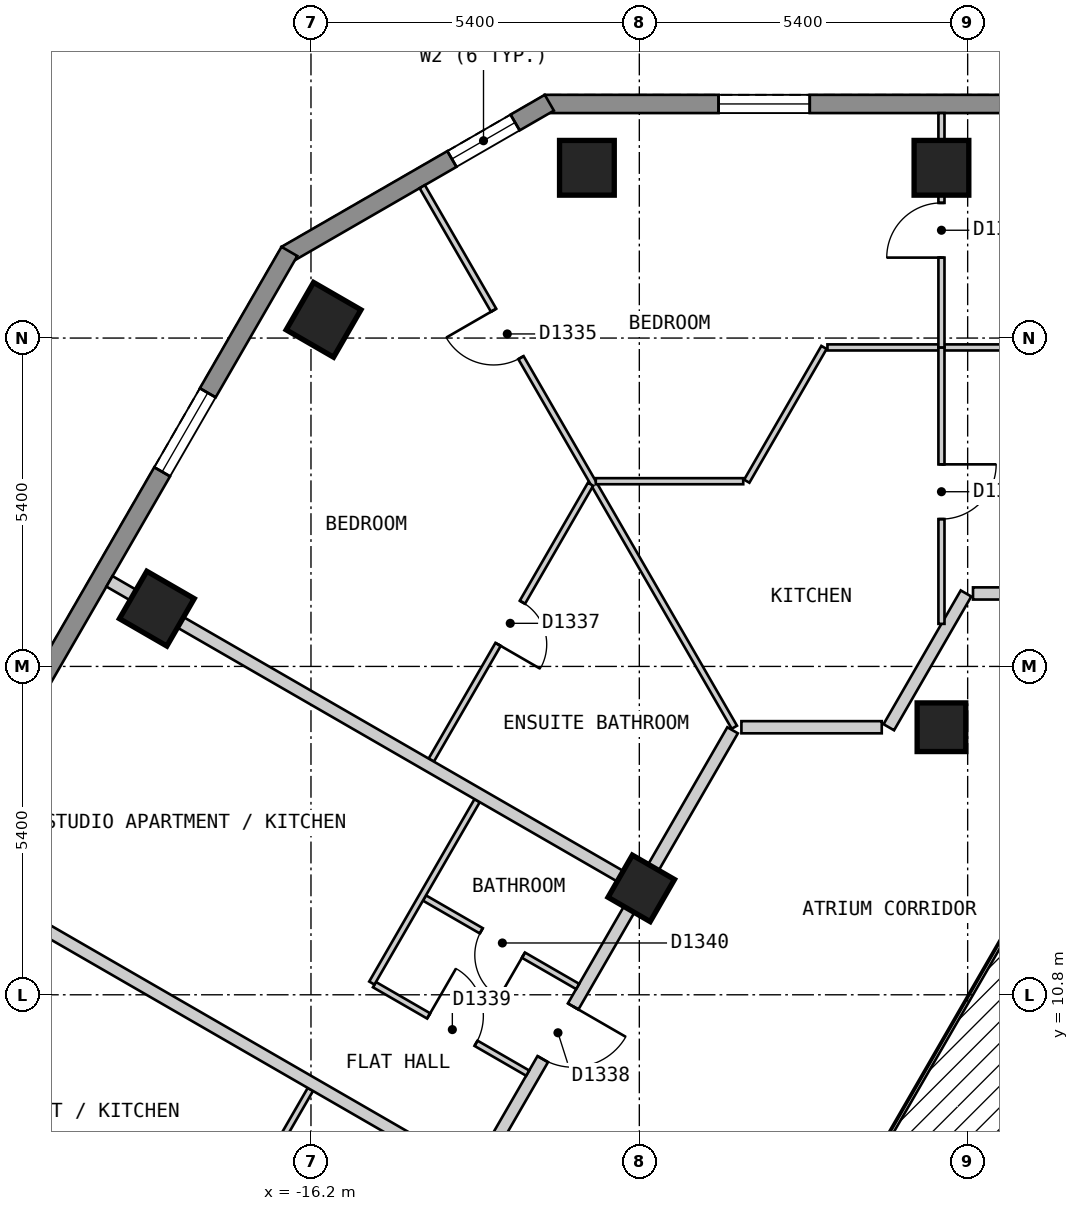
"""IFC4 building model, lengths in metres.
Left out: names, types, materials, properties, quantities, classifications, styles, units other than length and angle.
Written with IfcOpenShell. Run it as: python <this file> out.ifc"""

import sys

from ifc_helpers import new_model, si_unit, direction, frame, frame_2d, origin, origin_2d, place, context, subcontext, project, spatial, polyline, rectangle, outline, extrude, element, fill, save


model = new_model("IFC4")
c1 = context("Model", 3, precision=1e-05, world=origin(), true_north=direction((0.0, 1.0)))
c2 = subcontext(c1, "Body", "Model", "MODEL_VIEW")
j1 = project(units=[si_unit("LENGTHUNIT", "METRE"), si_unit("PLANEANGLEUNIT", "RADIAN")], contexts=[c1])
p1 = place(None, origin())
s1 = spatial("IfcSite", under=j1, at=p1, CompositionType="ELEMENT")
p2 = place(p1, origin())
s2 = spatial("IfcBuilding", under=s1, at=p2, CompositionType="ELEMENT")
p3 = place(p2, frame((0.0, 0.0, 135.6)))
s3 = spatial("IfcBuildingStorey", under=s2, at=p3, CompositionType="ELEMENT", Elevation=135.6)
for number, where, z_axis, x_axis in (
    (1, (-5.831, 24.4, 0.0), (0.0, 0.0, 1.0), (-1.0, 0.0, 0.0)),
    (2, (-11.662, 24.4, 0.0), (0.0, 0.0, 1.0), (-1.0, 0.0, 0.0)),
    (3, (-15.993, 21.9, 0.0), (0.0, 0.0, 1.0), (-0.5, -0.866, 0.0)),
    (4, (-18.735, 17.15, 0.0), (0.0, 0.0, 1.0), (-0.5, -0.866, 0.0)),
):
    element("IfcColumn", number, at=place(p3, frame(where, z_axis=z_axis, x_axis=x_axis)), inside=s3, PredefinedType="COLUMN", context=c2, shape_type="SweptSolid", body=[
        extrude(rectangle(XDim=0.9, YDim=0.9, at=origin_2d()), origin(), (0.0, 0.0, 1.0), 3.0),
    ])
for number, where, z_axis, x_axis in (
    (5, (-5.831, 15.2, 0.0), (0.0, 0.0, 1.0), (-1.0, 0.0, 0.0)),
    (6, (-10.768, 12.55, 0.0), (0.0, 0.0, 1.0), (-0.5, -0.866, 0.0)),
):
    element("IfcColumn", number, at=place(p3, frame(where, z_axis=z_axis, x_axis=x_axis)), inside=s3, PredefinedType="COLUMN", context=c2, shape_type="SweptSolid", body=[
        extrude(rectangle(XDim=0.8, YDim=0.8, at=origin_2d()), origin(), (0.0, 0.0, 1.0), 3.0),
    ])
p4 = place(p3, frame((12.355, 25.45, 0.0), z_axis=(0.0, 0.0, 1.0), x_axis=(-1.0, 0.0, 0.0)))
e7 = element("IfcWall", 7, at=p4, inside=s3, PredefinedType="SOLIDWALL", context=c2, shape_type="SweptSolid", body=[
    extrude(outline(polyline([(0.0, -0.15), (24.71, -0.15), (24.63, 0.15), (0.08, 0.15), (0.0, -0.15)])), origin(), (0.0, 0.0, 1.0), 2.7),
])
p5 = place(p4, frame((2.858, 0.0, 0.15)))
e8 = element("IfcOpeningElement", 8, at=p5, cuts=e7, PredefinedType="OPENING", context=c2, shape_type="SweptSolid", body=[
    extrude(rectangle(XDim=1.5, YDim=2.1, at=frame_2d((0.75, 1.05))), frame((0.0, 0.16, 0.0), z_axis=(0.0, -1.0, 0.0), x_axis=(1.0, 0.0, 0.0)), (0.0, 0.0, 1.0), 0.32),
])
p6 = place(p4, frame((8.689, 0.0, 0.15)))
e9 = element("IfcOpeningElement", 9, at=p6, cuts=e7, PredefinedType="OPENING", context=c2, shape_type="SweptSolid", body=[
    extrude(rectangle(XDim=1.5, YDim=2.1, at=frame_2d((0.75, 1.05))), frame((0.0, 0.16, 0.0), z_axis=(0.0, -1.0, 0.0), x_axis=(1.0, 0.0, 0.0)), (0.0, 0.0, 1.0), 0.32),
])
p7 = place(p4, frame((14.521, 0.0, 0.15)))
e10 = element("IfcOpeningElement", 10, at=p7, cuts=e7, PredefinedType="OPENING", context=c2, shape_type="SweptSolid", body=[
    extrude(rectangle(XDim=1.5, YDim=2.1, at=frame_2d((0.75, 1.05))), frame((0.0, 0.16, 0.0), z_axis=(0.0, -1.0, 0.0), x_axis=(1.0, 0.0, 0.0)), (0.0, 0.0, 1.0), 0.32),
])
p8 = place(p4, frame((20.352, 0.0, 0.15)))
e11 = element("IfcOpeningElement", 11, at=p8, cuts=e7, PredefinedType="OPENING", context=c2, shape_type="SweptSolid", body=[
    extrude(rectangle(XDim=1.5, YDim=2.1, at=frame_2d((0.75, 1.05))), frame((0.0, 0.16, 0.0), z_axis=(0.0, -1.0, 0.0), x_axis=(1.0, 0.0, 0.0)), (0.0, 0.0, 1.0), 0.32),
])
p9 = place(p3, frame((-12.28, 25.47, 0.0), z_axis=(0.0, 0.0, 1.0), x_axis=(-0.866022959057, -0.500004234368, 0.0)))
e12 = element("IfcWall", 12, at=p9, inside=s3, PredefinedType="SOLIDWALL", context=c2, shape_type="SweptSolid", body=[
    extrude(outline(polyline([(0.0, -0.15), (5.0, -0.15), (4.92, 0.15), (0.08, 0.15), (0.0, -0.15)])), origin(), (0.0, 0.0, 1.0), 2.7),
])
p10 = place(p9, frame((0.65, 0.0, 0.15)))
e13 = element("IfcOpeningElement", 13, at=p10, cuts=e12, PredefinedType="OPENING", context=c2, shape_type="SweptSolid", body=[
    extrude(rectangle(XDim=1.2, YDim=2.1, at=frame_2d((0.6, 1.05))), frame((0.0, 0.16, 0.0), z_axis=(0.0, -1.0, 0.0), x_axis=(1.0, 0.0, 0.0)), (0.0, 0.0, 1.0), 0.32),
])
p11 = place(p3, frame((-16.555, 23.025, 0.0), z_axis=(0.0, 0.0, 1.0), x_axis=(-0.500020536353, -0.866013546791, 0.0)))
e14 = element("IfcWall", 14, at=p11, inside=s3, PredefinedType="SOLIDWALL", context=c2, shape_type="SweptSolid", body=[
    extrude(outline(polyline([(0.0, -0.15), (23.325, -0.15), (23.245, 0.15), (0.08, 0.15), (0.0, -0.15)])), origin(), (0.0, 0.0, 1.0), 2.7),
])
p12 = place(p11, frame((2.685, 0.0, 0.15)))
e15 = element("IfcOpeningElement", 15, at=p12, cuts=e14, PredefinedType="OPENING", context=c2, shape_type="SweptSolid", body=[
    extrude(rectangle(XDim=1.5, YDim=2.1, at=frame_2d((0.75, 1.05))), frame((0.0, 0.16, 0.0), z_axis=(0.0, -1.0, 0.0), x_axis=(1.0, 0.0, 0.0)), (0.0, 0.0, 1.0), 0.32),
])
p13 = place(p11, frame((8.171, 0.0, 0.15)))
e16 = element("IfcOpeningElement", 16, at=p13, cuts=e14, PredefinedType="OPENING", context=c2, shape_type="SweptSolid", body=[
    extrude(rectangle(XDim=1.5, YDim=2.1, at=frame_2d((0.75, 1.05))), frame((0.0, 0.16, 0.0), z_axis=(0.0, -1.0, 0.0), x_axis=(1.0, 0.0, 0.0)), (0.0, 0.0, 1.0), 0.32),
])
p14 = place(p11, frame((13.655, 0.0, 0.15)))
e17 = element("IfcOpeningElement", 17, at=p14, cuts=e14, PredefinedType="OPENING", context=c2, shape_type="SweptSolid", body=[
    extrude(rectangle(XDim=1.5, YDim=2.1, at=frame_2d((0.75, 1.05))), frame((0.0, 0.16, 0.0), z_axis=(0.0, -1.0, 0.0), x_axis=(1.0, 0.0, 0.0)), (0.0, 0.0, 1.0), 0.32),
])
p15 = place(p11, frame((19.14, 0.0, 0.15)))
e18 = element("IfcOpeningElement", 18, at=p15, cuts=e14, PredefinedType="OPENING", context=c2, shape_type="SweptSolid", body=[
    extrude(rectangle(XDim=1.5, YDim=2.1, at=frame_2d((0.75, 1.05))), frame((0.0, 0.16, 0.0), z_axis=(0.0, -1.0, 0.0), x_axis=(1.0, 0.0, 0.0)), (0.0, 0.0, 1.0), 0.32),
])
p16 = place(p3, frame((-9.121, 15.2, 0.0), z_axis=(0.0, 0.0, 1.0), x_axis=(1.0, 0.0, 0.0)))
e19 = element("IfcWall", 19, at=p16, inside=s3, PredefinedType="PARTITIONING", context=c2, shape_type="SweptSolid", body=[
    extrude(rectangle(XDim=2.308, YDim=0.2, at=frame_2d((1.154, 0.0))), origin(), (0.0, 0.0, 1.0), 2.7),
])
p17 = place(p3, frame((-5.312, 17.4, 0.0), z_axis=(0.0, 0.0, 1.0), x_axis=(1.0, 0.0, 0.0)))
e20 = element("IfcWall", 20, at=p17, inside=s3, PredefinedType="PARTITIONING", context=c2, shape_type="SweptSolid", body=[
    extrude(rectangle(XDim=10.739, YDim=0.2, at=frame_2d((5.37, 0.0))), origin(), (0.0, 0.0, 1.0), 2.7),
])
p18 = place(p17, frame((1.896, 0.0, 0.0)))
e21 = element("IfcOpeningElement", 21, at=p18, cuts=e20, PredefinedType="OPENING", context=c2, shape_type="SweptSolid", body=[
    extrude(rectangle(XDim=1.0, YDim=2.1, at=frame_2d((0.5, 1.05))), frame((0.0, 0.11, 0.0), z_axis=(0.0, -1.0, 0.0), x_axis=(1.0, 0.0, 0.0)), (0.0, 0.0, 1.0), 0.22),
])
p19 = place(p3, frame((-6.697, 15.2, 0.0), z_axis=(0.0, 0.0, 1.0), x_axis=(0.499963722229, 0.866046347752, 0.0)))
e22 = element("IfcWall", 22, at=p19, inside=s3, PredefinedType="PARTITIONING", context=c2, shape_type="SweptSolid", body=[
    extrude(rectangle(XDim=2.54, YDim=0.2, at=frame_2d((1.27, 0.0))), origin(), (0.0, 0.0, 1.0), 2.7),
])
p20 = place(p3, frame((-17.724, 0.5, 0.0), z_axis=(0.0, 0.0, 1.0), x_axis=(0.499994801602, 0.86602840506, 0.0)))
e23 = element("IfcWall", 23, at=p20, inside=s3, PredefinedType="PARTITIONING", context=c2, shape_type="SweptSolid", body=[
    extrude(rectangle(XDim=16.916, YDim=0.2, at=frame_2d((8.458, 0.0))), origin(), (0.0, 0.0, 1.0), 2.7),
])
p21 = place(p20, frame((10.672, 0.0, 0.0)))
e24 = element("IfcOpeningElement", 24, at=p21, cuts=e23, PredefinedType="OPENING", context=c2, shape_type="SweptSolid", body=[
    extrude(rectangle(XDim=1.0, YDim=2.1, at=frame_2d((0.5, 1.05))), frame((0.0, 0.11, 0.0), z_axis=(0.0, -1.0, 0.0), x_axis=(1.0, 0.0, 0.0)), (0.0, 0.0, 1.0), 0.22),
])
p22 = place(p20, frame((5.187, 0.0, 0.0)))
e25 = element("IfcOpeningElement", 25, at=p22, cuts=e23, PredefinedType="OPENING", context=c2, shape_type="SweptSolid", body=[
    extrude(rectangle(XDim=1.0, YDim=2.1, at=frame_2d((0.5, 1.05))), frame((0.0, 0.11, 0.0), z_axis=(0.0, -1.0, 0.0), x_axis=(1.0, 0.0, 0.0)), (0.0, 0.0, 1.0), 0.22),
])
p23 = place(p20, frame((0.566, 0.0, 0.0)))
e26 = element("IfcOpeningElement", 26, at=p23, cuts=e23, PredefinedType="OPENING", context=c2, shape_type="SweptSolid", body=[
    extrude(rectangle(XDim=1.0, YDim=2.1, at=frame_2d((0.5, 1.05))), frame((0.0, 0.11, 0.0), z_axis=(0.0, -1.0, 0.0), x_axis=(1.0, 0.0, 0.0)), (0.0, 0.0, 1.0), 0.22),
])
p24 = place(p3, frame((-14.37, 24.09, 0.0), z_axis=(0.0, 0.0, 1.0), x_axis=(0.50002438799, -0.866011322914, 0.0)))
e27 = element("IfcWall", 27, at=p24, inside=s3, PredefinedType="PARTITIONING", context=c2, shape_type="SweptSolid", body=[
    extrude(rectangle(XDim=10.266, YDim=0.1, at=frame_2d((5.133, 0.0))), origin(), (0.0, 0.0, 1.0), 2.7),
])
p25 = place(p24, frame((2.347, 0.0, 0.0)))
e28 = element("IfcOpeningElement", 28, at=p25, cuts=e27, PredefinedType="OPENING", context=c2, shape_type="SweptSolid", body=[
    extrude(rectangle(XDim=0.9, YDim=2.1, at=frame_2d((0.45, 1.05))), frame((0.0, 0.06, 0.0), z_axis=(0.0, -1.0, 0.0), x_axis=(1.0, 0.0, 0.0)), (0.0, 0.0, 1.0), 0.12),
])
p26 = place(p3, frame((-14.334, 12.392, 0.0), z_axis=(0.0, 0.0, 1.0), x_axis=(0.866003949776, -0.500037157592, 0.0)))
e29 = element("IfcWall", 29, at=p26, inside=s3, PredefinedType="PARTITIONING", context=c2, shape_type="SweptSolid", body=[
    extrude(rectangle(XDim=2.91, YDim=0.1, at=frame_2d((1.455, 0.0))), origin(), (0.0, 0.0, 1.0), 2.7),
])
p27 = place(p26, frame((1.08, 0.0, 0.0)))
e30 = element("IfcOpeningElement", 30, at=p27, cuts=e29, PredefinedType="OPENING", context=c2, shape_type="SweptSolid", body=[
    extrude(rectangle(XDim=0.8, YDim=2.1, at=frame_2d((0.4, 1.05))), frame((0.0, 0.06, 0.0), z_axis=(0.0, -1.0, 0.0), x_axis=(1.0, 0.0, 0.0)), (0.0, 0.0, 1.0), 0.12),
])
p28 = place(p3, frame((-15.156, 10.967, 0.0), z_axis=(0.0, 0.0, 1.0), x_axis=(0.866003949776, -0.500037157592, 0.0)))
e31 = element("IfcWall", 31, at=p28, inside=s3, PredefinedType="PARTITIONING", context=c2, shape_type="SweptSolid", body=[
    extrude(rectangle(XDim=2.91, YDim=0.1, at=frame_2d((1.455, 0.0))), origin(), (0.0, 0.0, 1.0), 2.7),
])
p29 = place(p28, frame((1.029, 0.0, 0.0)))
e32 = element("IfcOpeningElement", 32, at=p29, cuts=e31, PredefinedType="OPENING", context=c2, shape_type="SweptSolid", body=[
    extrude(rectangle(XDim=0.9, YDim=2.1, at=frame_2d((0.45, 1.05))), frame((0.0, 0.06, 0.0), z_axis=(0.0, -1.0, 0.0), x_axis=(1.0, 0.0, 0.0)), (0.0, 0.0, 1.0), 0.12),
])
p30 = place(p3, frame((-11.516, 19.246, 0.0), z_axis=(0.0, 0.0, 1.0), x_axis=(1.0, 0.0, 0.0)))
e33 = element("IfcWall", 33, at=p30, inside=s3, PredefinedType="PARTITIONING", context=c2, shape_type="SweptSolid", body=[
    extrude(rectangle(XDim=2.425, YDim=0.1, at=frame_2d((1.212, 0.0))), origin(), (0.0, 0.0, 1.0), 2.7),
])
p31 = place(p3, frame((-7.706, 21.446, 0.0), z_axis=(0.0, 0.0, 1.0), x_axis=(1.0, 0.0, 0.0)))
e34 = element("IfcWall", 34, at=p31, inside=s3, PredefinedType="PARTITIONING", context=c2, shape_type="SweptSolid", body=[
    extrude(rectangle(XDim=15.469, YDim=0.1, at=frame_2d((7.734, 0.0))), origin(), (0.0, 0.0, 1.0), 2.7),
])
p32 = place(p31, frame((4.35, 0.0, 0.0)))
e35 = element("IfcOpeningElement", 35, at=p32, cuts=e34, PredefinedType="OPENING", context=c2, shape_type="SweptSolid", body=[
    extrude(rectangle(XDim=0.9, YDim=2.1, at=frame_2d((0.45, 1.05))), frame((0.0, 0.06, 0.0), z_axis=(0.0, -1.0, 0.0), x_axis=(1.0, 0.0, 0.0)), (0.0, 0.0, 1.0), 0.12),
])
p33 = place(p3, frame((-9.033, 19.246, 0.0), z_axis=(0.0, 0.0, 1.0), x_axis=(0.499963722229, 0.866046347752, 0.0)))
e36 = element("IfcWall", 36, at=p33, inside=s3, PredefinedType="PARTITIONING", context=c2, shape_type="SweptSolid", body=[
    extrude(rectangle(XDim=2.54, YDim=0.1, at=frame_2d((1.27, 0.0))), origin(), (0.0, 0.0, 1.0), 2.7),
])
p34 = place(p3, frame((-17.942, 6.243, 0.0), z_axis=(0.0, 0.0, 1.0), x_axis=(0.49997462182, 0.866040055388, 0.0)))
e37 = element("IfcWall", 37, at=p34, inside=s3, PredefinedType="PARTITIONING", context=c2, shape_type="SweptSolid", body=[
    extrude(rectangle(XDim=3.464, YDim=0.1, at=frame_2d((1.732, 0.0))), origin(), (0.0, 0.0, 1.0), 2.7),
])
p35 = place(p3, frame((-15.199, 10.993, 0.0), z_axis=(0.0, 0.0, 1.0), x_axis=(0.499885210257, 0.866091667531, 0.0)))
e38 = element("IfcWall", 38, at=p35, inside=s3, PredefinedType="PARTITIONING", context=c2, shape_type="SweptSolid", body=[
    extrude(rectangle(XDim=3.463, YDim=0.1, at=frame_2d((1.731, 0.0))), origin(), (0.0, 0.0, 1.0), 2.7),
])
p36 = place(p3, frame((-14.222, 14.659, 0.0), z_axis=(0.0, 0.0, 1.0), x_axis=(0.500053212623, 0.865994679283, 0.0)))
e39 = element("IfcWall", 39, at=p36, inside=s3, PredefinedType="PARTITIONING", context=c2, shape_type="SweptSolid", body=[
    extrude(rectangle(XDim=5.239, YDim=0.1, at=frame_2d((2.62, 0.0))), origin(), (0.0, 0.0, 1.0), 2.7),
])
p37 = place(p36, frame((2.198, 0.0, 0.0)))
e40 = element("IfcOpeningElement", 40, at=p37, cuts=e39, PredefinedType="OPENING", context=c2, shape_type="SweptSolid", body=[
    extrude(rectangle(XDim=0.8, YDim=2.1, at=frame_2d((0.4, 1.05))), frame((0.0, 0.06, 0.0), z_axis=(0.0, -1.0, 0.0), x_axis=(1.0, 0.0, 0.0)), (0.0, 0.0, 1.0), 0.12),
])
p38 = place(p3, frame((-5.831, 16.9, 0.0), z_axis=(0.0, 0.0, 1.0), x_axis=(0.0, 1.0, 0.0)))
e41 = element("IfcWall", 41, at=p38, inside=s3, PredefinedType="PARTITIONING", context=c2, shape_type="SweptSolid", body=[
    extrude(rectangle(XDim=4.546, YDim=0.1, at=frame_2d((2.273, 0.0))), origin(), (0.0, 0.0, 1.0), 2.7),
])
p39 = place(p38, frame((1.723, 0.0, 0.0)))
e42 = element("IfcOpeningElement", 42, at=p39, cuts=e41, PredefinedType="OPENING", context=c2, shape_type="SweptSolid", body=[
    extrude(rectangle(XDim=0.9, YDim=2.1, at=frame_2d((0.45, 1.05))), frame((0.0, 0.06, 0.0), z_axis=(0.0, -1.0, 0.0), x_axis=(1.0, 0.0, 0.0)), (0.0, 0.0, 1.0), 0.12),
])
p40 = place(p3, frame((-22.257, 12.85, 0.0), z_axis=(0.0, 0.0, 1.0), x_axis=(0.866047370643, -0.499961950354, 0.0)))
e43 = element("IfcWall", 43, at=p40, inside=s3, PredefinedType="PARTITIONING", context=c2, shape_type="SweptSolid", body=[
    extrude(rectangle(XDim=10.001, YDim=0.2, at=frame_2d((5.0, 0.0))), origin(), (0.0, 0.0, 1.0), 2.7),
])
p41 = place(p3, frame((-19.514, 17.599, 0.0), z_axis=(0.0, 0.0, 1.0), x_axis=(0.866059142644, -0.499941558027, 0.0)))
e44 = element("IfcWall", 44, at=p41, inside=s3, PredefinedType="PARTITIONING", context=c2, shape_type="SweptSolid", body=[
    extrude(rectangle(XDim=9.999, YDim=0.2, at=frame_2d((5.0, 0.0))), origin(), (0.0, 0.0, 1.0), 2.7),
])
p42 = place(p3, frame((-5.831, 21.446, 0.0), z_axis=(0.0, 0.0, 1.0), x_axis=(0.0, 1.0, 0.0)))
e45 = element("IfcWall", 45, at=p42, inside=s3, PredefinedType="PARTITIONING", context=c2, shape_type="SweptSolid", body=[
    extrude(rectangle(XDim=3.854, YDim=0.1, at=frame_2d((1.927, 0.0))), origin(), (0.0, 0.0, 1.0), 2.7),
])
p43 = place(p42, frame((1.477, 0.0, 0.0)))
e46 = element("IfcOpeningElement", 46, at=p43, cuts=e45, PredefinedType="OPENING", context=c2, shape_type="SweptSolid", body=[
    extrude(rectangle(XDim=0.9, YDim=2.1, at=frame_2d((0.45, 1.05))), frame((0.0, 0.06, 0.0), z_axis=(0.0, -1.0, 0.0), x_axis=(1.0, 0.0, 0.0)), (0.0, 0.0, 1.0), 0.12),
])
p44 = place(p8, origin())
e47 = element("IfcWindow", 47, at=p44, inside=s3, PartitioningType="SINGLE_PANEL", PredefinedType="WINDOW", context=c2, shape_type="SweptSolid", body=[
    extrude(rectangle(XDim=1.5, YDim=2.1, at=frame_2d((0.75, 1.05))), frame((0.0, 0.03, 0.0), z_axis=(0.0, -1.0, 0.0), x_axis=(1.0, 0.0, 0.0)), (0.0, 0.0, 1.0), 0.06),
])
fill(e11, e47)
p45 = place(p10, origin())
e48 = element("IfcWindow", 48, at=p45, inside=s3, PartitioningType="SINGLE_PANEL", PredefinedType="WINDOW", context=c2, shape_type="SweptSolid", body=[
    extrude(rectangle(XDim=1.2, YDim=2.1, at=frame_2d((0.6, 1.05))), frame((0.0, 0.03, 0.0), z_axis=(0.0, -1.0, 0.0), x_axis=(1.0, 0.0, 0.0)), (0.0, 0.0, 1.0), 0.06),
])
fill(e13, e48)
p46 = place(p12, origin())
e49 = element("IfcWindow", 49, at=p46, inside=s3, PartitioningType="SINGLE_PANEL", PredefinedType="WINDOW", context=c2, shape_type="SweptSolid", body=[
    extrude(rectangle(XDim=1.5, YDim=2.1, at=frame_2d((0.75, 1.05))), frame((0.0, 0.03, 0.0), z_axis=(0.0, -1.0, 0.0), x_axis=(1.0, 0.0, 0.0)), (0.0, 0.0, 1.0), 0.06),
])
fill(e15, e49)
p47 = place(p39, origin())
e50 = element("IfcDoor", 50, at=p47, inside=s3, OperationType="SINGLE_SWING_RIGHT", PredefinedType="DOOR", context=c2, shape_type="SweptSolid", body=[
    extrude(rectangle(XDim=0.9, YDim=2.1, at=frame_2d((0.45, 1.05))), frame((0.0, 0.025, 0.0), z_axis=(0.0, -1.0, 0.0), x_axis=(1.0, 0.0, 0.0)), (0.0, 0.0, 1.0), 0.05),
])
fill(e42, e50)
p48 = place(p43, origin())
e51 = element("IfcDoor", 51, at=p48, inside=s3, OperationType="SINGLE_SWING_LEFT", PredefinedType="DOOR", context=c2, shape_type="SweptSolid", body=[
    extrude(rectangle(XDim=0.9, YDim=2.1, at=frame_2d((0.45, 1.05))), frame((0.0, 0.025, 0.0), z_axis=(0.0, -1.0, 0.0), x_axis=(1.0, 0.0, 0.0)), (0.0, 0.0, 1.0), 0.05),
])
fill(e46, e51)
p49 = place(p25, origin())
e52 = element("IfcDoor", 52, at=p49, inside=s3, OperationType="SINGLE_SWING_LEFT", PredefinedType="DOOR", context=c2, shape_type="SweptSolid", body=[
    extrude(rectangle(XDim=0.9, YDim=2.1, at=frame_2d((0.45, 1.05))), frame((0.0, 0.025, 0.0), z_axis=(0.0, -1.0, 0.0), x_axis=(1.0, 0.0, 0.0)), (0.0, 0.0, 1.0), 0.05),
])
fill(e28, e52)
p50 = place(p37, origin())
e53 = element("IfcDoor", 53, at=p50, inside=s3, OperationType="SINGLE_SWING_LEFT", PredefinedType="DOOR", context=c2, shape_type="SweptSolid", body=[
    extrude(rectangle(XDim=0.8, YDim=2.1, at=frame_2d((0.4, 1.05))), frame((0.0, 0.025, 0.0), z_axis=(0.0, -1.0, 0.0), x_axis=(1.0, 0.0, 0.0)), (0.0, 0.0, 1.0), 0.05),
])
fill(e40, e53)
p51 = place(p21, origin())
e54 = element("IfcDoor", 54, at=p51, inside=s3, OperationType="SINGLE_SWING_RIGHT", PredefinedType="DOOR", context=c2, shape_type="SweptSolid", body=[
    extrude(rectangle(XDim=1.0, YDim=2.1, at=frame_2d((0.5, 1.05))), frame((0.0, 0.025, 0.0), z_axis=(0.0, -1.0, 0.0), x_axis=(1.0, 0.0, 0.0)), (0.0, 0.0, 1.0), 0.05),
])
fill(e24, e54)
p52 = place(p29, origin())
e55 = element("IfcDoor", 55, at=p52, inside=s3, OperationType="SINGLE_SWING_LEFT", PredefinedType="DOOR", context=c2, shape_type="SweptSolid", body=[
    extrude(rectangle(XDim=0.9, YDim=2.1, at=frame_2d((0.45, 1.05))), frame((0.0, 0.025, 0.0), z_axis=(0.0, -1.0, 0.0), x_axis=(1.0, 0.0, 0.0)), (0.0, 0.0, 1.0), 0.05),
])
fill(e32, e55)
p53 = place(p27, origin())
e56 = element("IfcDoor", 56, at=p53, inside=s3, OperationType="SINGLE_SWING_RIGHT", PredefinedType="DOOR", context=c2, shape_type="SweptSolid", body=[
    extrude(rectangle(XDim=0.8, YDim=2.1, at=frame_2d((0.4, 1.05))), frame((0.0, 0.025, 0.0), z_axis=(0.0, -1.0, 0.0), x_axis=(1.0, 0.0, 0.0)), (0.0, 0.0, 1.0), 0.05),
])
fill(e30, e56)
save(model, sys.argv[1])
